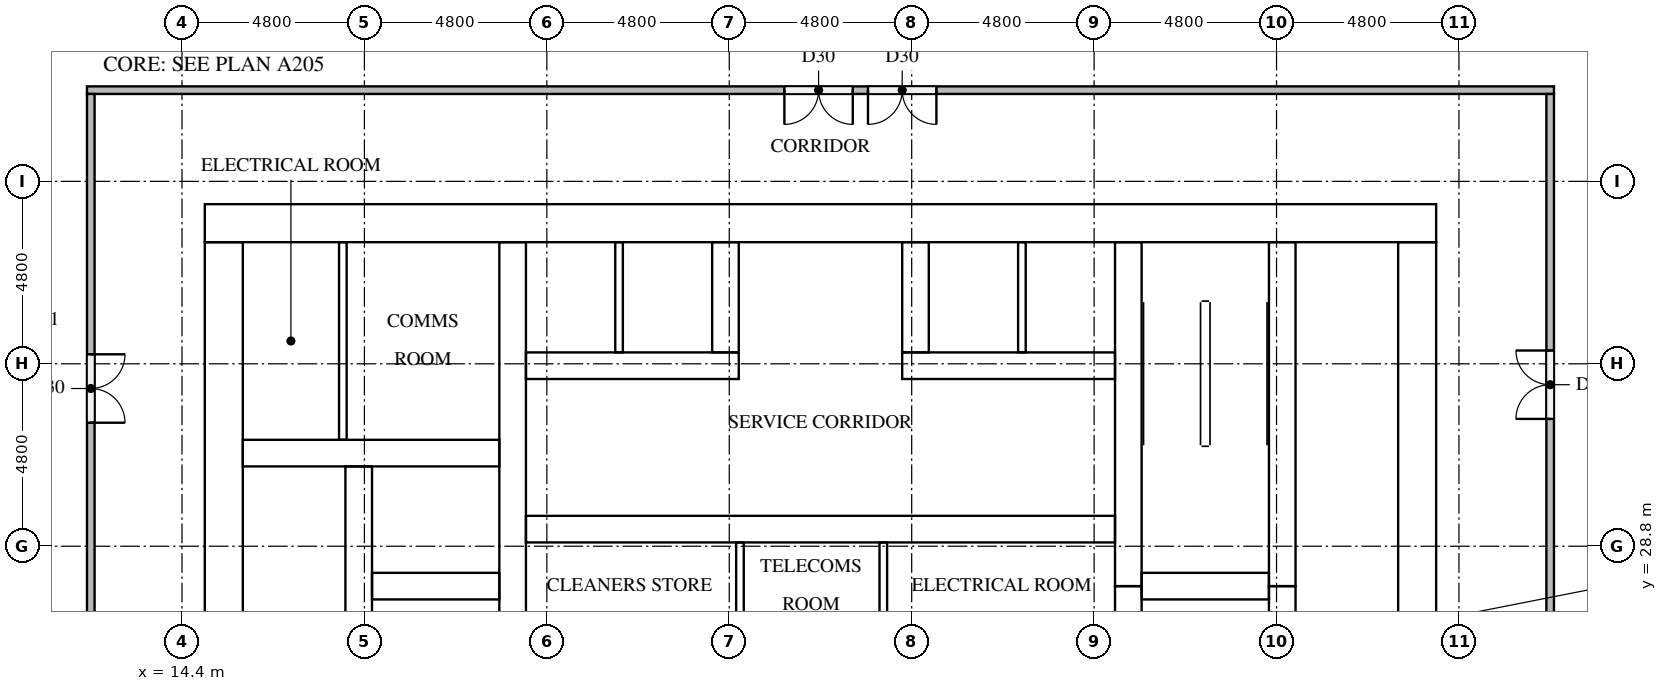
"""IFC4 building model, lengths in metres.
Left out: names, types, materials, properties, quantities, classifications, styles, units other than length and angle.
Written with IfcOpenShell. Run it as: python <this file> out.ifc"""

import sys

from ifc_helpers import new_model, si_unit, direction, frame, frame_2d, origin, place, context, subcontext, project, spatial, rectangle, extrude, element, fill, save


model = new_model("IFC4")
c1 = context("Model", 3, precision=1e-05, world=origin(), true_north=direction((0.0, 1.0)))
c2 = subcontext(c1, "Body", "Model", "MODEL_VIEW")
j1 = project(units=[si_unit("LENGTHUNIT", "METRE"), si_unit("PLANEANGLEUNIT", "RADIAN")], contexts=[c1])
p1 = place(None, origin())
s1 = spatial("IfcSite", under=j1, at=p1, CompositionType="ELEMENT")
p2 = place(p1, origin())
s2 = spatial("IfcBuilding", under=s1, at=p2, CompositionType="ELEMENT")
p3 = place(p2, frame((0.0, 0.0, 19.5)))
s3 = spatial("IfcBuildingStorey", under=s2, at=p3, CompositionType="ELEMENT", Elevation=19.5)
p4 = place(p3, frame((15.0, 37.3, 0.0), z_axis=(0.0, 0.0, 1.0), x_axis=(1.0, 0.0, 0.0)))
e1 = element("IfcWall", 1, at=p4, inside=s3, PredefinedType="SHEAR", context=c2, shape_type="SweptSolid", body=[
    extrude(rectangle(XDim=32.4, YDim=1.0, at=frame_2d((16.2, 0.0))), origin(), (0.0, 0.0, 1.0), 4.1),
])
p5 = place(p4, frame((15.3, 0.0, 0.0)))
e2 = element("IfcOpeningElement", 2, at=p5, cuts=e1, PredefinedType="OPENING", context=c2, shape_type="SweptSolid", body=[
    extrude(rectangle(XDim=1.8, YDim=2.1, at=frame_2d((0.9, 1.05))), frame((0.0, 0.51, 0.0), z_axis=(0.0, -1.0, 0.0), x_axis=(1.0, 0.0, 0.0)), (0.0, 0.0, 1.0), 1.02),
])
p6 = place(p4, frame((1.766, 0.0, 0.0)))
e3 = element("IfcOpeningElement", 3, at=p6, cuts=e1, PredefinedType="OPENING", context=c2, shape_type="SweptSolid", body=[
    extrude(rectangle(XDim=1.0, YDim=2.1, at=frame_2d((0.5, 1.05))), frame((0.0, 0.51, 0.0), z_axis=(0.0, -1.0, 0.0), x_axis=(1.0, 0.0, 0.0)), (0.0, 0.0, 1.0), 1.02),
])
p7 = place(p4, frame((5.241, 0.0, 0.0)))
e4 = element("IfcOpeningElement", 4, at=p7, cuts=e1, PredefinedType="OPENING", context=c2, shape_type="SweptSolid", body=[
    extrude(rectangle(XDim=1.0, YDim=2.1, at=frame_2d((0.5, 1.05))), frame((0.0, 0.51, 0.0), z_axis=(0.0, -1.0, 0.0), x_axis=(1.0, 0.0, 0.0)), (0.0, 0.0, 1.0), 1.02),
])
p8 = place(p3, frame((15.5, 16.0, 0.0), z_axis=(0.0, 0.0, 1.0), x_axis=(0.0, 1.0, 0.0)))
e5 = element("IfcWall", 5, at=p8, inside=s3, PredefinedType="SHEAR", context=c2, shape_type="SweptSolid", body=[
    extrude(rectangle(XDim=20.8, YDim=1.0, at=frame_2d((10.4, 0.0))), origin(), (0.0, 0.0, 1.0), 4.1),
])
p9 = place(p8, frame((4.76, 0.0, 0.0)))
e6 = element("IfcOpeningElement", 6, at=p9, cuts=e5, PredefinedType="OPENING", context=c2, shape_type="SweptSolid", body=[
    extrude(rectangle(XDim=1.2, YDim=2.1, at=frame_2d((0.6, 1.05))), frame((0.0, 0.51, 0.0), z_axis=(0.0, -1.0, 0.0), x_axis=(1.0, 0.0, 0.0)), (0.0, 0.0, 1.0), 1.02),
])
p10 = place(p3, frame((46.9, 16.0, 0.0), z_axis=(0.0, 0.0, 1.0), x_axis=(0.0, 1.0, 0.0)))
e7 = element("IfcWall", 7, at=p10, inside=s3, PredefinedType="SHEAR", context=c2, shape_type="SweptSolid", body=[
    extrude(rectangle(XDim=20.8, YDim=1.0, at=frame_2d((10.4, 0.0))), origin(), (0.0, 0.0, 1.0), 4.1),
])
p11 = place(p10, frame((10.1, 0.0, 0.0)))
e8 = element("IfcOpeningElement", 8, at=p11, cuts=e7, PredefinedType="OPENING", context=c2, shape_type="SweptSolid", body=[
    extrude(rectangle(XDim=1.2, YDim=2.1, at=frame_2d((0.6, 1.05))), frame((0.0, 0.51, 0.0), z_axis=(0.0, -1.0, 0.0), x_axis=(1.0, 0.0, 0.0)), (0.0, 0.0, 1.0), 1.02),
])
p12 = place(p3, frame((19.05, 16.0, 0.0), z_axis=(0.0, 0.0, 1.0), x_axis=(0.0, 1.0, 0.0)))
e9 = element("IfcWall", 9, at=p12, inside=s3, PredefinedType="SHEAR", context=c2, shape_type="SweptSolid", body=[
    extrude(rectangle(XDim=14.9, YDim=0.7, at=frame_2d((7.45, 0.0))), origin(), (0.0, 0.0, 1.0), 4.1),
])
p13 = place(p12, frame((9.45, 0.0, 0.0)))
e10 = element("IfcOpeningElement", 10, at=p13, cuts=e9, PredefinedType="OPENING", context=c2, shape_type="SweptSolid", body=[
    extrude(rectangle(XDim=1.1, YDim=2.1, at=frame_2d((0.55, 1.05))), frame((0.0, 0.36, 0.0), z_axis=(0.0, -1.0, 0.0), x_axis=(1.0, 0.0, 0.0)), (0.0, 0.0, 1.0), 0.72),
])
p14 = place(p12, frame((12.95, 0.0, 0.0)))
e11 = element("IfcOpeningElement", 11, at=p14, cuts=e9, PredefinedType="OPENING", context=c2, shape_type="SweptSolid", body=[
    extrude(rectangle(XDim=1.1, YDim=2.1, at=frame_2d((0.55, 1.05))), frame((0.0, 0.36, 0.0), z_axis=(0.0, -1.0, 0.0), x_axis=(1.0, 0.0, 0.0)), (0.0, 0.0, 1.0), 0.72),
])
p15 = place(p12, frame((0.2, 0.0, 0.0)))
e12 = element("IfcOpeningElement", 12, at=p15, cuts=e9, PredefinedType="OPENING", context=c2, shape_type="SweptSolid", body=[
    extrude(rectangle(XDim=1.2, YDim=2.1, at=frame_2d((0.6, 1.05))), frame((0.0, 0.36, 0.0), z_axis=(0.0, -1.0, 0.0), x_axis=(1.0, 0.0, 0.0)), (0.0, 0.0, 1.0), 0.72),
])
p16 = place(p3, frame((23.1, 16.0, 0.0), z_axis=(0.0, 0.0, 1.0), x_axis=(0.0, 1.0, 0.0)))
e13 = element("IfcWall", 13, at=p16, inside=s3, PredefinedType="SHEAR", context=c2, shape_type="SweptSolid", body=[
    extrude(rectangle(XDim=20.8, YDim=0.7, at=frame_2d((10.4, 0.0))), origin(), (0.0, 0.0, 1.0), 4.1),
])
p17 = place(p3, frame((39.3, 24.25, 0.0), z_axis=(0.0, 0.0, 1.0), x_axis=(0.0, 1.0, 0.0)))
e14 = element("IfcWall", 14, at=p17, inside=s3, PredefinedType="SHEAR", context=c2, shape_type="SweptSolid", body=[
    extrude(rectangle(XDim=3.5, YDim=0.7, at=frame_2d((1.75, 0.0))), origin(), (0.0, 0.0, 1.0), 4.1),
])
p18 = place(p3, frame((39.3, 27.75, 0.0), z_axis=(0.0, 0.0, 1.0), x_axis=(0.0, 1.0, 0.0)))
e15 = element("IfcWall", 15, at=p18, inside=s3, PredefinedType="SHEAR", context=c2, shape_type="SweptSolid", body=[
    extrude(rectangle(XDim=9.05, YDim=0.7, at=frame_2d((4.525, 0.0))), origin(), (0.0, 0.0, 1.0), 4.1),
])
p19 = place(p3, frame((43.35, 24.25, 0.0), z_axis=(0.0, 0.0, 1.0), x_axis=(0.0, 1.0, 0.0)))
e16 = element("IfcWall", 16, at=p19, inside=s3, PredefinedType="SHEAR", context=c2, shape_type="SweptSolid", body=[
    extrude(rectangle(XDim=3.5, YDim=0.7, at=frame_2d((1.75, 0.0))), origin(), (0.0, 0.0, 1.0), 4.1),
])
p20 = place(p19, frame((1.2, 0.0, 0.0)))
e17 = element("IfcOpeningElement", 17, at=p20, cuts=e16, PredefinedType="OPENING", context=c2, shape_type="SweptSolid", body=[
    extrude(rectangle(XDim=1.1, YDim=2.1, at=frame_2d((0.55, 1.05))), frame((0.0, 0.36, 0.0), z_axis=(0.0, -1.0, 0.0), x_axis=(1.0, 0.0, 0.0)), (0.0, 0.0, 1.0), 0.72),
])
p21 = place(p3, frame((43.35, 27.75, 0.0), z_axis=(0.0, 0.0, 1.0), x_axis=(0.0, 1.0, 0.0)))
e18 = element("IfcWall", 18, at=p21, inside=s3, PredefinedType="SHEAR", context=c2, shape_type="SweptSolid", body=[
    extrude(rectangle(XDim=9.05, YDim=0.7, at=frame_2d((4.525, 0.0))), origin(), (0.0, 0.0, 1.0), 4.1),
])
p22 = place(p21, frame((7.65, 0.0, 0.0)))
e19 = element("IfcOpeningElement", 19, at=p22, cuts=e18, PredefinedType="OPENING", context=c2, shape_type="SweptSolid", body=[
    extrude(rectangle(XDim=1.2, YDim=2.1, at=frame_2d((0.6, 1.05))), frame((0.0, 0.36, 0.0), z_axis=(0.0, -1.0, 0.0), x_axis=(1.0, 0.0, 0.0)), (0.0, 0.0, 1.0), 0.72),
])
p23 = place(p3, frame((19.4, 27.75, 0.0), z_axis=(0.0, 0.0, 1.0), x_axis=(1.0, 0.0, 0.0)))
e20 = element("IfcWall", 20, at=p23, inside=s3, PredefinedType="SHEAR", context=c2, shape_type="SweptSolid", body=[
    extrude(rectangle(XDim=3.35, YDim=0.7, at=frame_2d((1.675, 0.0))), origin(), (0.0, 0.0, 1.0), 4.1),
])
p24 = place(p3, frame((16.0, 31.25, 0.0), z_axis=(0.0, 0.0, 1.0), x_axis=(1.0, 0.0, 0.0)))
e21 = element("IfcWall", 21, at=p24, inside=s3, PredefinedType="SHEAR", context=c2, shape_type="SweptSolid", body=[
    extrude(rectangle(XDim=6.75, YDim=0.7, at=frame_2d((3.375, 0.0))), origin(), (0.0, 0.0, 1.0), 4.1),
])
p25 = place(p3, frame((39.65, 27.75, 0.0), z_axis=(0.0, 0.0, 1.0), x_axis=(1.0, 0.0, 0.0)))
e22 = element("IfcWall", 22, at=p25, inside=s3, PredefinedType="SHEAR", context=c2, shape_type="SweptSolid", body=[
    extrude(rectangle(XDim=3.35, YDim=0.7, at=frame_2d((1.675, 0.0))), origin(), (0.0, 0.0, 1.0), 4.1),
])
p26 = place(p3, frame((23.45, 29.25, 0.0), z_axis=(0.0, 0.0, 1.0), x_axis=(1.0, 0.0, 0.0)))
e23 = element("IfcWall", 23, at=p26, inside=s3, PredefinedType="SHEAR", context=c2, shape_type="SweptSolid", body=[
    extrude(rectangle(XDim=15.5, YDim=0.7, at=frame_2d((7.75, 0.0))), origin(), (0.0, 0.0, 1.0), 4.1),
])
p27 = place(p26, frame((2.266, 0.0, 0.0)))
e24 = element("IfcOpeningElement", 24, at=p27, cuts=e23, PredefinedType="OPENING", context=c2, shape_type="SweptSolid", body=[
    extrude(rectangle(XDim=1.0, YDim=2.1, at=frame_2d((0.5, 1.05))), frame((0.0, 0.36, 0.0), z_axis=(0.0, -1.0, 0.0), x_axis=(1.0, 0.0, 0.0)), (0.0, 0.0, 1.0), 0.72),
])
p28 = place(p26, frame((7.018, 0.0, 0.0)))
e25 = element("IfcOpeningElement", 25, at=p28, cuts=e23, PredefinedType="OPENING", context=c2, shape_type="SweptSolid", body=[
    extrude(rectangle(XDim=1.0, YDim=2.1, at=frame_2d((0.5, 1.05))), frame((0.0, 0.36, 0.0), z_axis=(0.0, -1.0, 0.0), x_axis=(1.0, 0.0, 0.0)), (0.0, 0.0, 1.0), 0.72),
])
p29 = place(p26, frame((12.002, 0.0, 0.0)))
e26 = element("IfcOpeningElement", 26, at=p29, cuts=e23, PredefinedType="OPENING", context=c2, shape_type="SweptSolid", body=[
    extrude(rectangle(XDim=1.0, YDim=2.1, at=frame_2d((0.5, 1.05))), frame((0.0, 0.36, 0.0), z_axis=(0.0, -1.0, 0.0), x_axis=(1.0, 0.0, 0.0)), (0.0, 0.0, 1.0), 0.72),
])
p30 = place(p3, frame((23.45, 33.55, 0.0), z_axis=(0.0, 0.0, 1.0), x_axis=(1.0, 0.0, 0.0)))
e27 = element("IfcWall", 27, at=p30, inside=s3, PredefinedType="SHEAR", context=c2, shape_type="SweptSolid", body=[
    extrude(rectangle(XDim=5.6, YDim=0.7, at=frame_2d((2.8, 0.0))), origin(), (0.0, 0.0, 1.0), 4.1),
])
p31 = place(p3, frame((33.35, 33.55, 0.0), z_axis=(0.0, 0.0, 1.0), x_axis=(1.0, 0.0, 0.0)))
e28 = element("IfcWall", 28, at=p31, inside=s3, PredefinedType="SHEAR", context=c2, shape_type="SweptSolid", body=[
    extrude(rectangle(XDim=5.6, YDim=0.7, at=frame_2d((2.8, 0.0))), origin(), (0.0, 0.0, 1.0), 4.1),
])
for number, where, z_axis, x_axis in (
    (29, (28.7, 33.9, 0.0), (0.0, 0.0, 1.0), (0.0, 1.0, 0.0)),
    (30, (33.7, 33.9, 0.0), (0.0, 0.0, 1.0), (0.0, 1.0, 0.0)),
):
    element("IfcWall", number, at=place(p3, frame(where, z_axis=z_axis, x_axis=x_axis)), inside=s3, PredefinedType="SHEAR", context=c2, shape_type="SweptSolid", body=[
        extrude(rectangle(XDim=2.9, YDim=0.7, at=frame_2d((1.45, 0.0))), origin(), (0.0, 0.0, 1.0), 4.1),
    ])
for number, where, z_axis, x_axis in (
    (31, (25.9, 33.9, 0.0), (0.0, 0.0, 1.0), (0.0, 1.0, 0.0)),
    (32, (36.5, 33.9, 0.0), (0.0, 0.0, 1.0), (0.0, 1.0, 0.0)),
):
    element("IfcWall", number, at=place(p3, frame(where, z_axis=z_axis, x_axis=x_axis)), inside=s3, PredefinedType="SOLIDWALL", context=c2, shape_type="SweptSolid", body=[
        extrude(rectangle(XDim=2.9, YDim=0.2, at=frame_2d((1.45, 0.0))), origin(), (0.0, 0.0, 1.0), 4.1),
    ])
p32 = place(p3, frame((18.633, 31.6, 0.0), z_axis=(0.0, 0.0, 1.0), x_axis=(0.0, 1.0, 0.0)))
e33 = element("IfcWall", 33, at=p32, inside=s3, PredefinedType="PARTITIONING", context=c2, shape_type="SweptSolid", body=[
    extrude(rectangle(XDim=5.2, YDim=0.2, at=frame_2d((2.6, 0.0))), origin(), (0.0, 0.0, 1.0), 4.1),
])
for number, where, z_axis, x_axis in (
    (34, (29.082, 26.5, 0.0), (0.0, 0.0, 1.0), (0.0, 1.0, 0.0)),
    (35, (32.853, 26.5, 0.0), (0.0, 0.0, 1.0), (0.0, 1.0, 0.0)),
):
    element("IfcWall", number, at=place(p3, frame(where, z_axis=z_axis, x_axis=x_axis)), inside=s3, PredefinedType="PARTITIONING", context=c2, shape_type="SweptSolid", body=[
        extrude(rectangle(XDim=2.4, YDim=0.2, at=frame_2d((1.2, 0.0))), origin(), (0.0, 0.0, 1.0), 4.1),
    ])
p33 = place(p3, frame((50.5, 40.8, 0.0), z_axis=(0.0, 0.0, 1.0), x_axis=(-1.0, 0.0, 0.0)))
e36 = element("IfcWall", 36, at=p33, inside=s3, PredefinedType="PARTITIONING", context=c2, shape_type="SweptSolid", body=[
    extrude(rectangle(XDim=38.6, YDim=0.2, at=frame_2d((19.3, 0.0))), origin(), (0.0, 0.0, 1.0), 4.1),
])
p34 = place(p33, frame((18.45, 0.0, 0.0)))
e37 = element("IfcOpeningElement", 37, at=p34, cuts=e36, PredefinedType="OPENING", context=c2, shape_type="SweptSolid", body=[
    extrude(rectangle(XDim=1.8, YDim=2.1, at=frame_2d((0.9, 1.05))), frame((0.0, 0.11, 0.0), z_axis=(0.0, -1.0, 0.0), x_axis=(1.0, 0.0, 0.0)), (0.0, 0.0, 1.0), 0.22),
])
p35 = place(p33, frame((16.25, 0.0, 0.0)))
e38 = element("IfcOpeningElement", 38, at=p35, cuts=e36, PredefinedType="OPENING", context=c2, shape_type="SweptSolid", body=[
    extrude(rectangle(XDim=1.8, YDim=2.1, at=frame_2d((0.9, 1.05))), frame((0.0, 0.11, 0.0), z_axis=(0.0, -1.0, 0.0), x_axis=(1.0, 0.0, 0.0)), (0.0, 0.0, 1.0), 0.22),
])
p36 = place(p3, frame((12.0, 40.7, 0.0), z_axis=(0.0, 0.0, 1.0), x_axis=(0.0, -1.0, 0.0)))
e39 = element("IfcWall", 39, at=p36, inside=s3, PredefinedType="PARTITIONING", context=c2, shape_type="SweptSolid", body=[
    extrude(rectangle(XDim=28.6, YDim=0.2, at=frame_2d((14.3, 0.0))), origin(), (0.0, 0.0, 1.0), 4.1),
])
p37 = place(p36, frame((6.85, 0.0, 0.0)))
e40 = element("IfcOpeningElement", 40, at=p37, cuts=e39, PredefinedType="OPENING", context=c2, shape_type="SweptSolid", body=[
    extrude(rectangle(XDim=1.8, YDim=2.1, at=frame_2d((0.9, 1.05))), frame((0.0, 0.11, 0.0), z_axis=(0.0, -1.0, 0.0), x_axis=(1.0, 0.0, 0.0)), (0.0, 0.0, 1.0), 0.22),
])
p38 = place(p3, frame((50.4, 12.1, 0.0), z_axis=(0.0, 0.0, 1.0), x_axis=(0.0, 1.0, 0.0)))
e41 = element("IfcWall", 41, at=p38, inside=s3, PredefinedType="PARTITIONING", context=c2, shape_type="SweptSolid", body=[
    extrude(rectangle(XDim=28.6, YDim=0.2, at=frame_2d((14.3, 0.0))), origin(), (0.0, 0.0, 1.0), 4.1),
])
p39 = place(p38, frame((20.05, 0.0, 0.0)))
e42 = element("IfcOpeningElement", 42, at=p39, cuts=e41, PredefinedType="OPENING", context=c2, shape_type="SweptSolid", body=[
    extrude(rectangle(XDim=1.8, YDim=2.1, at=frame_2d((0.9, 1.05))), frame((0.0, 0.11, 0.0), z_axis=(0.0, -1.0, 0.0), x_axis=(1.0, 0.0, 0.0)), (0.0, 0.0, 1.0), 0.22),
])
p40 = place(p14, origin())
e43 = element("IfcDoor", 43, at=p40, inside=s3, OperationType="DOUBLE_DOOR_SLIDING", PredefinedType="DOOR", context=c2, shape_type="SweptSolid", body=[
    extrude(rectangle(XDim=1.1, YDim=2.1, at=frame_2d((0.55, 1.05))), frame((0.0, 0.025, 0.0), z_axis=(0.0, -1.0, 0.0), x_axis=(1.0, 0.0, 0.0)), (0.0, 0.0, 1.0), 0.05),
])
fill(e11, e43)
p41 = place(p22, origin())
e44 = element("IfcDoor", 44, at=p41, inside=s3, OperationType="SINGLE_SWING_RIGHT", PredefinedType="DOOR", context=c2, shape_type="SweptSolid", body=[
    extrude(rectangle(XDim=1.2, YDim=2.1, at=frame_2d((0.6, 1.05))), frame((0.0, 0.025, 0.0), z_axis=(0.0, -1.0, 0.0), x_axis=(1.0, 0.0, 0.0)), (0.0, 0.0, 1.0), 0.05),
])
fill(e19, e44)
p42 = place(p5, origin())
e45 = element("IfcDoor", 45, at=p42, inside=s3, OperationType="DOUBLE_DOOR_SINGLE_SWING", PredefinedType="DOOR", context=c2, shape_type="SweptSolid", body=[
    extrude(rectangle(XDim=1.8, YDim=2.1, at=frame_2d((0.9, 1.05))), frame((0.0, 0.025, 0.0), z_axis=(0.0, -1.0, 0.0), x_axis=(1.0, 0.0, 0.0)), (0.0, 0.0, 1.0), 0.05),
])
fill(e2, e45)
p43 = place(p11, origin())
e46 = element("IfcDoor", 46, at=p43, inside=s3, OperationType="SINGLE_SWING_RIGHT", PredefinedType="DOOR", context=c2, shape_type="SweptSolid", body=[
    extrude(rectangle(XDim=1.2, YDim=2.1, at=frame_2d((0.6, 1.05))), frame((0.0, 0.025, 0.0), z_axis=(0.0, -1.0, 0.0), x_axis=(1.0, 0.0, 0.0)), (0.0, 0.0, 1.0), 0.05),
])
fill(e8, e46)
p44 = place(p6, origin())
e47 = element("IfcDoor", 47, at=p44, inside=s3, OperationType="SINGLE_SWING_LEFT", PredefinedType="DOOR", context=c2, shape_type="SweptSolid", body=[
    extrude(rectangle(XDim=1.0, YDim=2.1, at=frame_2d((0.5, 1.05))), frame((0.0, 0.025, 0.0), z_axis=(0.0, -1.0, 0.0), x_axis=(1.0, 0.0, 0.0)), (0.0, 0.0, 1.0), 0.05),
])
fill(e3, e47)
p45 = place(p7, origin())
e48 = element("IfcDoor", 48, at=p45, inside=s3, OperationType="SINGLE_SWING_RIGHT", PredefinedType="DOOR", context=c2, shape_type="SweptSolid", body=[
    extrude(rectangle(XDim=1.0, YDim=2.1, at=frame_2d((0.5, 1.05))), frame((0.0, 0.025, 0.0), z_axis=(0.0, -1.0, 0.0), x_axis=(1.0, 0.0, 0.0)), (0.0, 0.0, 1.0), 0.05),
])
fill(e4, e48)
p46 = place(p27, origin())
e49 = element("IfcDoor", 49, at=p46, inside=s3, OperationType="SINGLE_SWING_LEFT", PredefinedType="DOOR", context=c2, shape_type="SweptSolid", body=[
    extrude(rectangle(XDim=1.0, YDim=2.1, at=frame_2d((0.5, 1.05))), frame((0.0, 0.025, 0.0), z_axis=(0.0, -1.0, 0.0), x_axis=(1.0, 0.0, 0.0)), (0.0, 0.0, 1.0), 0.05),
])
fill(e24, e49)
p47 = place(p28, origin())
e50 = element("IfcDoor", 50, at=p47, inside=s3, OperationType="SINGLE_SWING_RIGHT", PredefinedType="DOOR", context=c2, shape_type="SweptSolid", body=[
    extrude(rectangle(XDim=1.0, YDim=2.1, at=frame_2d((0.5, 1.05))), frame((0.0, 0.025, 0.0), z_axis=(0.0, -1.0, 0.0), x_axis=(1.0, 0.0, 0.0)), (0.0, 0.0, 1.0), 0.05),
])
fill(e25, e50)
p48 = place(p29, origin())
e51 = element("IfcDoor", 51, at=p48, inside=s3, OperationType="SINGLE_SWING_LEFT", PredefinedType="DOOR", context=c2, shape_type="SweptSolid", body=[
    extrude(rectangle(XDim=1.0, YDim=2.1, at=frame_2d((0.5, 1.05))), frame((0.0, 0.025, 0.0), z_axis=(0.0, -1.0, 0.0), x_axis=(1.0, 0.0, 0.0)), (0.0, 0.0, 1.0), 0.05),
])
fill(e26, e51)
p49 = place(p34, origin())
e52 = element("IfcDoor", 52, at=p49, inside=s3, OperationType="DOUBLE_DOOR_SINGLE_SWING", PredefinedType="DOOR", context=c2, shape_type="SweptSolid", body=[
    extrude(rectangle(XDim=1.8, YDim=2.1, at=frame_2d((0.9, 1.05))), frame((0.0, 0.025, 0.0), z_axis=(0.0, -1.0, 0.0), x_axis=(1.0, 0.0, 0.0)), (0.0, 0.0, 1.0), 0.05),
])
fill(e37, e52)
p50 = place(p35, origin())
e53 = element("IfcDoor", 53, at=p50, inside=s3, OperationType="DOUBLE_DOOR_SINGLE_SWING", PredefinedType="DOOR", context=c2, shape_type="SweptSolid", body=[
    extrude(rectangle(XDim=1.8, YDim=2.1, at=frame_2d((0.9, 1.05))), frame((0.0, 0.025, 0.0), z_axis=(0.0, -1.0, 0.0), x_axis=(1.0, 0.0, 0.0)), (0.0, 0.0, 1.0), 0.05),
])
fill(e38, e53)
p51 = place(p37, origin())
e54 = element("IfcDoor", 54, at=p51, inside=s3, OperationType="DOUBLE_DOOR_SINGLE_SWING", PredefinedType="DOOR", context=c2, shape_type="SweptSolid", body=[
    extrude(rectangle(XDim=1.8, YDim=2.1, at=frame_2d((0.9, 1.05))), frame((0.0, 0.025, 0.0), z_axis=(0.0, -1.0, 0.0), x_axis=(1.0, 0.0, 0.0)), (0.0, 0.0, 1.0), 0.05),
])
fill(e40, e54)
p52 = place(p39, origin())
e55 = element("IfcDoor", 55, at=p52, inside=s3, OperationType="DOUBLE_DOOR_SINGLE_SWING", PredefinedType="DOOR", context=c2, shape_type="SweptSolid", body=[
    extrude(rectangle(XDim=1.8, YDim=2.1, at=frame_2d((0.9, 1.05))), frame((0.0, 0.025, 0.0), z_axis=(0.0, -1.0, 0.0), x_axis=(1.0, 0.0, 0.0)), (0.0, 0.0, 1.0), 0.05),
])
fill(e42, e55)
save(model, sys.argv[1])
